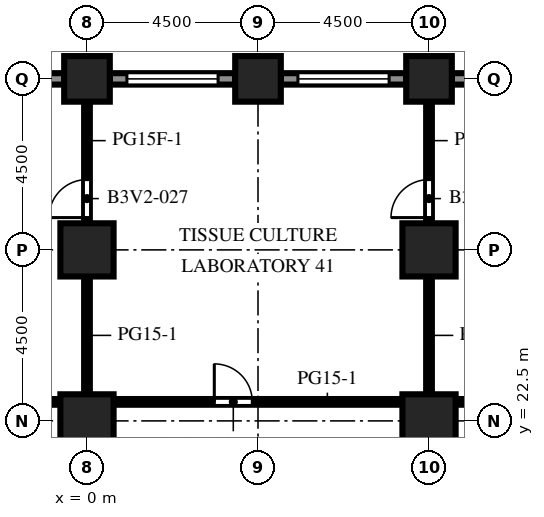
"""IFC4 building model, lengths in metres.
Left out: names, types, materials, properties, quantities, classifications, styles, units other than length and angle.
Written with IfcOpenShell. Run it as: python <this file> out.ifc"""

import sys

from ifc_helpers import new_model, si_unit, direction, frame, frame_2d, origin, origin_2d, place, context, subcontext, project, spatial, rectangle, extrude, element, fill, save


model = new_model("IFC4")
c1 = context("Model", 3, precision=1e-05, world=origin(), true_north=direction((0.0, 1.0)))
c2 = subcontext(c1, "Body", "Model", "MODEL_VIEW")
j1 = project(units=[si_unit("LENGTHUNIT", "METRE"), si_unit("PLANEANGLEUNIT", "RADIAN")], contexts=[c1])
p1 = place(None, origin())
s1 = spatial("IfcSite", under=j1, at=p1, CompositionType="ELEMENT")
p2 = place(p1, origin())
s2 = spatial("IfcBuilding", under=s1, at=p2, CompositionType="ELEMENT")
p3 = place(p2, frame((0.0, 0.0, 102.5)))
s3 = spatial("IfcBuildingStorey", under=s2, at=p3, CompositionType="ELEMENT", Elevation=102.5)
for number, where, z_axis, x_axis in (
    (1, (0.0, 31.5, 0.0), (0.0, 0.0, 1.0), (1.0, 0.0, 0.0)),
    (2, (4.5, 31.5, 0.0), (0.0, 0.0, 1.0), (1.0, 0.0, 0.0)),
    (3, (9.0, 31.5, 0.0), (0.0, 0.0, 1.0), (1.0, 0.0, 0.0)),
):
    element("IfcColumn", number, at=place(p3, frame(where, z_axis=z_axis, x_axis=x_axis)), inside=s3, PredefinedType="COLUMN", context=c2, shape_type="SweptSolid", body=[
        extrude(rectangle(XDim=1.2, YDim=1.2, at=origin_2d()), origin(), (0.0, 0.0, 1.0), 4.1),
    ])
for number, where, z_axis, x_axis in (
    (4, (0.0, 22.5, 0.0), (0.0, 0.0, 1.0), (1.0, 0.0, 0.0)),
    (5, (0.0, 27.0, 0.0), (0.0, 0.0, 1.0), (1.0, 0.0, 0.0)),
    (6, (9.0, 22.5, 0.0), (0.0, 0.0, 1.0), (1.0, 0.0, 0.0)),
    (7, (9.0, 27.0, 0.0), (0.0, 0.0, 1.0), (1.0, 0.0, 0.0)),
):
    element("IfcColumn", number, at=place(p3, frame(where, z_axis=z_axis, x_axis=x_axis)), inside=s3, PredefinedType="COLUMN", context=c2, shape_type="SweptSolid", body=[
        extrude(rectangle(XDim=1.4, YDim=1.4, at=origin_2d()), origin(), (0.0, 0.0, 1.0), 4.1),
    ])
p4 = place(p3, frame((9.6, 31.5, 0.0), z_axis=(0.0, 0.0, 1.0), x_axis=(1.0, 0.0, 0.0)))
e8 = element("IfcWall", 8, at=p4, inside=s3, PredefinedType="SOLIDWALL", context=c2, shape_type="SweptSolid", body=[
    extrude(rectangle(XDim=3.3, YDim=0.3, at=frame_2d((1.65, 0.0))), origin(), (0.0, 0.0, 1.0), 2.75),
])
p5 = place(p4, frame((0.45, 0.0, 0.8)))
e9 = element("IfcOpeningElement", 9, at=p5, cuts=e8, PredefinedType="OPENING", context=c2, shape_type="SweptSolid", body=[
    extrude(rectangle(XDim=2.4, YDim=1.7, at=frame_2d((1.2, 0.85))), frame((0.0, 0.16, 0.0), z_axis=(0.0, -1.0, 0.0), x_axis=(1.0, 0.0, 0.0)), (0.0, 0.0, 1.0), 0.32),
])
p6 = place(p3, frame((5.1, 31.5, 0.0), z_axis=(0.0, 0.0, 1.0), x_axis=(1.0, 0.0, 0.0)))
e10 = element("IfcWall", 10, at=p6, inside=s3, PredefinedType="SOLIDWALL", context=c2, shape_type="SweptSolid", body=[
    extrude(rectangle(XDim=3.3, YDim=0.3, at=frame_2d((1.65, 0.0))), origin(), (0.0, 0.0, 1.0), 2.75),
])
p7 = place(p6, frame((0.45, 0.0, 0.8)))
e11 = element("IfcOpeningElement", 11, at=p7, cuts=e10, PredefinedType="OPENING", context=c2, shape_type="SweptSolid", body=[
    extrude(rectangle(XDim=2.4, YDim=1.7, at=frame_2d((1.2, 0.85))), frame((0.0, 0.16, 0.0), z_axis=(0.0, -1.0, 0.0), x_axis=(1.0, 0.0, 0.0)), (0.0, 0.0, 1.0), 0.32),
])
p8 = place(p3, frame((0.6, 31.5, 0.0), z_axis=(0.0, 0.0, 1.0), x_axis=(1.0, 0.0, 0.0)))
e12 = element("IfcWall", 12, at=p8, inside=s3, PredefinedType="SOLIDWALL", context=c2, shape_type="SweptSolid", body=[
    extrude(rectangle(XDim=3.3, YDim=0.3, at=frame_2d((1.65, 0.0))), origin(), (0.0, 0.0, 1.0), 2.75),
])
p9 = place(p8, frame((0.45, 0.0, 0.8)))
e13 = element("IfcOpeningElement", 13, at=p9, cuts=e12, PredefinedType="OPENING", context=c2, shape_type="SweptSolid", body=[
    extrude(rectangle(XDim=2.4, YDim=1.7, at=frame_2d((1.2, 0.85))), frame((0.0, 0.16, 0.0), z_axis=(0.0, -1.0, 0.0), x_axis=(1.0, 0.0, 0.0)), (0.0, 0.0, 1.0), 0.32),
])
p10 = place(p3, frame((-3.9, 31.5, 0.0), z_axis=(0.0, 0.0, 1.0), x_axis=(1.0, 0.0, 0.0)))
e14 = element("IfcWall", 14, at=p10, inside=s3, PredefinedType="SOLIDWALL", context=c2, shape_type="SweptSolid", body=[
    extrude(rectangle(XDim=3.3, YDim=0.3, at=frame_2d((1.65, 0.0))), origin(), (0.0, 0.0, 1.0), 2.75),
])
p11 = place(p10, frame((0.45, 0.0, 0.8)))
e15 = element("IfcOpeningElement", 15, at=p11, cuts=e14, PredefinedType="OPENING", context=c2, shape_type="SweptSolid", body=[
    extrude(rectangle(XDim=2.4, YDim=1.7, at=frame_2d((1.2, 0.85))), frame((0.0, 0.16, 0.0), z_axis=(0.0, -1.0, 0.0), x_axis=(1.0, 0.0, 0.0)), (0.0, 0.0, 1.0), 0.32),
])
p12 = place(p3, frame((0.0, 23.2, 0.0), z_axis=(0.0, 0.0, 1.0), x_axis=(0.0, 1.0, 0.0)))
e16 = element("IfcWall", 16, at=p12, inside=s3, PredefinedType="PARTITIONING", context=c2, shape_type="SweptSolid", body=[
    extrude(rectangle(XDim=3.1, YDim=0.15, at=frame_2d((1.55, 0.0))), origin(), (0.0, 0.0, 1.0), 3.65),
])
p13 = place(p3, frame((0.0, 30.9, 0.0), z_axis=(0.0, 0.0, 1.0), x_axis=(0.0, -1.0, 0.0)))
e17 = element("IfcWall", 17, at=p13, inside=s3, PredefinedType="PARTITIONING", context=c2, shape_type="SweptSolid", body=[
    extrude(rectangle(XDim=3.2, YDim=0.15, at=frame_2d((1.6, 0.0))), origin(), (0.0, 0.0, 1.0), 3.65),
])
p14 = place(p13, frame((2.05, 0.0, 0.0)))
e18 = element("IfcOpeningElement", 18, at=p14, cuts=e17, PredefinedType="OPENING", context=c2, shape_type="SweptSolid", body=[
    extrude(rectangle(XDim=1.0, YDim=2.1, at=frame_2d((0.5, 1.05))), frame((0.0, 0.085, 0.0), z_axis=(0.0, -1.0, 0.0), x_axis=(1.0, 0.0, 0.0)), (0.0, 0.0, 1.0), 0.17),
])
p15 = place(p3, frame((9.0, 23.2, 0.0), z_axis=(0.0, 0.0, 1.0), x_axis=(0.0, 1.0, 0.0)))
e19 = element("IfcWall", 19, at=p15, inside=s3, PredefinedType="PARTITIONING", context=c2, shape_type="SweptSolid", body=[
    extrude(rectangle(XDim=3.1, YDim=0.15, at=frame_2d((1.55, 0.0))), origin(), (0.0, 0.0, 1.0), 3.65),
])
p16 = place(p3, frame((9.0, 30.9, 0.0), z_axis=(0.0, 0.0, 1.0), x_axis=(0.0, -1.0, 0.0)))
e20 = element("IfcWall", 20, at=p16, inside=s3, PredefinedType="PARTITIONING", context=c2, shape_type="SweptSolid", body=[
    extrude(rectangle(XDim=3.2, YDim=0.15, at=frame_2d((1.6, 0.0))), origin(), (0.0, 0.0, 1.0), 3.65),
])
p17 = place(p16, frame((2.05, 0.0, 0.0)))
e21 = element("IfcOpeningElement", 21, at=p17, cuts=e20, PredefinedType="OPENING", context=c2, shape_type="SweptSolid", body=[
    extrude(rectangle(XDim=1.0, YDim=2.1, at=frame_2d((0.5, 1.05))), frame((0.0, 0.085, 0.0), z_axis=(0.0, -1.0, 0.0), x_axis=(1.0, 0.0, 0.0)), (0.0, 0.0, 1.0), 0.17),
])
p18 = place(p3, frame((-0.7, 23.0, 0.0), z_axis=(0.0, 0.0, 1.0), x_axis=(-1.0, 0.0, 0.0)))
e22 = element("IfcWall", 22, at=p18, inside=s3, PredefinedType="PARTITIONING", context=c2, shape_type="SweptSolid", body=[
    extrude(rectangle(XDim=7.6, YDim=0.15, at=frame_2d((3.8, 0.0))), origin(), (0.0, 0.0, 1.0), 3.65),
])
p19 = place(p18, frame((5.45, 0.0, 0.0)))
e23 = element("IfcOpeningElement", 23, at=p19, cuts=e22, PredefinedType="OPENING", context=c2, shape_type="SweptSolid", body=[
    extrude(rectangle(XDim=1.0, YDim=2.1, at=frame_2d((0.5, 1.05))), frame((0.0, 0.085, 0.0), z_axis=(0.0, -1.0, 0.0), x_axis=(1.0, 0.0, 0.0)), (0.0, 0.0, 1.0), 0.17),
])
p20 = place(p18, frame((0.95, 0.0, 0.0)))
e24 = element("IfcOpeningElement", 24, at=p20, cuts=e22, PredefinedType="OPENING", context=c2, shape_type="SweptSolid", body=[
    extrude(rectangle(XDim=1.0, YDim=2.1, at=frame_2d((0.5, 1.05))), frame((0.0, 0.085, 0.0), z_axis=(0.0, -1.0, 0.0), x_axis=(1.0, 0.0, 0.0)), (0.0, 0.0, 1.0), 0.17),
])
p21 = place(p3, frame((8.3, 23.0, 0.0), z_axis=(0.0, 0.0, 1.0), x_axis=(-1.0, 0.0, 0.0)))
e25 = element("IfcWall", 25, at=p21, inside=s3, PredefinedType="PARTITIONING", context=c2, shape_type="SweptSolid", body=[
    extrude(rectangle(XDim=7.6, YDim=0.15, at=frame_2d((3.8, 0.0))), origin(), (0.0, 0.0, 1.0), 3.65),
])
p22 = place(p21, frame((3.95, 0.0, 0.0)))
e26 = element("IfcOpeningElement", 26, at=p22, cuts=e25, PredefinedType="OPENING", context=c2, shape_type="SweptSolid", body=[
    extrude(rectangle(XDim=1.0, YDim=2.1, at=frame_2d((0.5, 1.05))), frame((0.0, 0.085, 0.0), z_axis=(0.0, -1.0, 0.0), x_axis=(1.0, 0.0, 0.0)), (0.0, 0.0, 1.0), 0.17),
])
p23 = place(p3, frame((17.3, 23.0, 0.0), z_axis=(0.0, 0.0, 1.0), x_axis=(-1.0, 0.0, 0.0)))
e27 = element("IfcWall", 27, at=p23, inside=s3, PredefinedType="PARTITIONING", context=c2, shape_type="SweptSolid", body=[
    extrude(rectangle(XDim=7.6, YDim=0.15, at=frame_2d((3.8, 0.0))), origin(), (0.0, 0.0, 1.0), 3.65),
])
p24 = place(p23, frame((5.7, 0.0, 0.0)))
e28 = element("IfcOpeningElement", 28, at=p24, cuts=e27, PredefinedType="OPENING", context=c2, shape_type="SweptSolid", body=[
    extrude(rectangle(XDim=1.0, YDim=2.1, at=frame_2d((0.5, 1.05))), frame((0.0, 0.085, 0.0), z_axis=(0.0, -1.0, 0.0), x_axis=(1.0, 0.0, 0.0)), (0.0, 0.0, 1.0), 0.17),
])
p25 = place(p23, frame((1.45, 0.0, 0.0)))
e29 = element("IfcOpeningElement", 29, at=p25, cuts=e27, PredefinedType="OPENING", context=c2, shape_type="SweptSolid", body=[
    extrude(rectangle(XDim=1.0, YDim=2.1, at=frame_2d((0.5, 1.05))), frame((0.0, 0.085, 0.0), z_axis=(0.0, -1.0, 0.0), x_axis=(1.0, 0.0, 0.0)), (0.0, 0.0, 1.0), 0.17),
])
p26 = place(p7, origin())
e30 = element("IfcWindow", 30, at=p26, inside=s3, PartitioningType="SINGLE_PANEL", PredefinedType="WINDOW", context=c2, shape_type="SweptSolid", body=[
    extrude(rectangle(XDim=2.4, YDim=1.7, at=frame_2d((1.2, 0.85))), frame((0.0, 0.03, 0.0), z_axis=(0.0, -1.0, 0.0), x_axis=(1.0, 0.0, 0.0)), (0.0, 0.0, 1.0), 0.06),
])
fill(e11, e30)
p27 = place(p9, origin())
e31 = element("IfcWindow", 31, at=p27, inside=s3, PartitioningType="SINGLE_PANEL", PredefinedType="WINDOW", context=c2, shape_type="SweptSolid", body=[
    extrude(rectangle(XDim=2.4, YDim=1.7, at=frame_2d((1.2, 0.85))), frame((0.0, 0.03, 0.0), z_axis=(0.0, -1.0, 0.0), x_axis=(1.0, 0.0, 0.0)), (0.0, 0.0, 1.0), 0.06),
])
fill(e13, e31)
p28 = place(p14, origin())
e32 = element("IfcDoor", 32, at=p28, inside=s3, OperationType="SINGLE_SWING_RIGHT", PredefinedType="DOOR", context=c2, shape_type="SweptSolid", body=[
    extrude(rectangle(XDim=1.0, YDim=2.1, at=frame_2d((0.5, 1.05))), frame((0.0, 0.025, 0.0), z_axis=(0.0, -1.0, 0.0), x_axis=(1.0, 0.0, 0.0)), (0.0, 0.0, 1.0), 0.05),
])
fill(e18, e32)
p29 = place(p17, origin())
e33 = element("IfcDoor", 33, at=p29, inside=s3, OperationType="SINGLE_SWING_RIGHT", PredefinedType="DOOR", context=c2, shape_type="SweptSolid", body=[
    extrude(rectangle(XDim=1.0, YDim=2.1, at=frame_2d((0.5, 1.05))), frame((0.0, 0.025, 0.0), z_axis=(0.0, -1.0, 0.0), x_axis=(1.0, 0.0, 0.0)), (0.0, 0.0, 1.0), 0.05),
])
fill(e21, e33)
p30 = place(p22, origin())
e34 = element("IfcDoor", 34, at=p30, inside=s3, OperationType="SINGLE_SWING_RIGHT", PredefinedType="DOOR", context=c2, shape_type="SweptSolid", body=[
    extrude(rectangle(XDim=1.0, YDim=2.1, at=frame_2d((0.5, 1.05))), frame((0.0, 0.025, 0.0), z_axis=(0.0, -1.0, 0.0), x_axis=(1.0, 0.0, 0.0)), (0.0, 0.0, 1.0), 0.05),
])
fill(e26, e34)
save(model, sys.argv[1])
